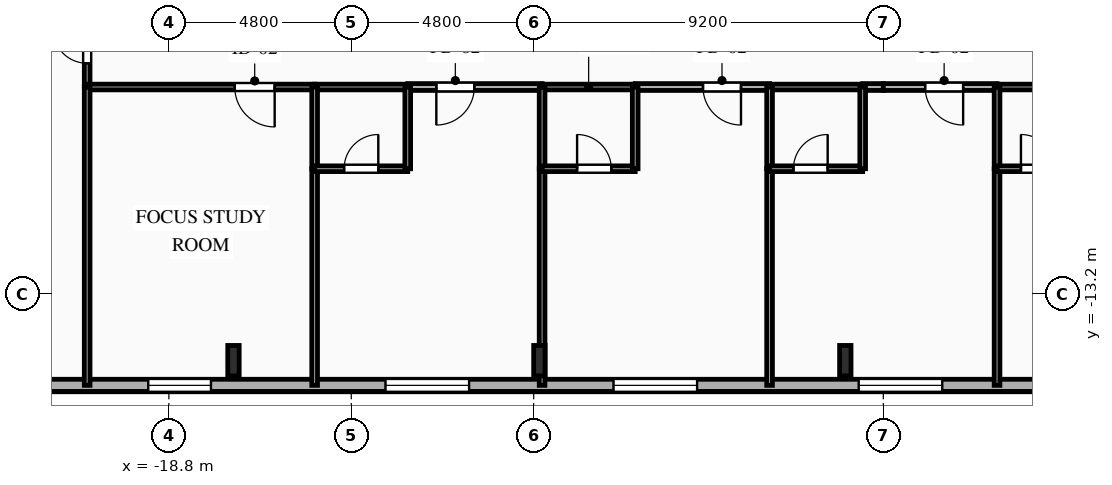
"""IFC4 building model, lengths in metres.
Left out: names, types, materials, properties, quantities, classifications, styles, units other than length and angle.
Written with IfcOpenShell. Run it as: python <this file> out.ifc"""

import sys

from ifc_helpers import new_model, si_unit, direction, frame, frame_2d, origin, origin_2d, place, context, subcontext, project, spatial, rectangle, i_section, extrude, element, fill, save


model = new_model("IFC4")
c1 = context("Model", 3, precision=1e-05, world=origin(), true_north=direction((0.0, 1.0)))
c2 = subcontext(c1, "Body", "Model", "MODEL_VIEW")
j1 = project(units=[si_unit("LENGTHUNIT", "METRE"), si_unit("PLANEANGLEUNIT", "RADIAN")], contexts=[c1])
p1 = place(None, origin())
s1 = spatial("IfcSite", under=j1, at=p1, CompositionType="ELEMENT")
p2 = place(p1, origin())
s2 = spatial("IfcBuilding", under=s1, at=p2, CompositionType="ELEMENT")
p3 = place(p2, frame((0.0, 0.0, 154.45)))
s3 = spatial("IfcBuildingStorey", under=s2, at=p3, CompositionType="ELEMENT", Elevation=154.45)
for number, where, z_axis, x_axis in (
    (1, (-17.1, -14.95, 0.0), (0.0, 0.0, 1.0), (1.0, 0.0, 0.0)),
    (2, (-9.05, -14.95, 0.0), (0.0, 0.0, 1.0), (1.0, 0.0, 0.0)),
    (3, (-1.0, -14.95, 0.0), (0.0, 0.0, 1.0), (1.0, 0.0, 0.0)),
):
    element("IfcColumn", number, at=place(p3, frame(where, z_axis=z_axis, x_axis=x_axis)), inside=s3, PredefinedType="COLUMN", context=c2, shape_type="SweptSolid", body=[
        extrude(i_section(OverallWidth=0.3, OverallDepth=0.8, WebThickness=0.018, FlangeThickness=0.033, FilletRadius=0.03, at=origin_2d()), origin(), (0.0, 0.0, 1.0), 3.35),
    ])
p4 = place(p3, frame((23.8, -15.6, 0.0), z_axis=(0.0, 0.0, 1.0), x_axis=(-1.0, 0.0, 0.0)))
e4 = element("IfcWall", 4, at=p4, inside=s3, PredefinedType="SOLIDWALL", context=c2, shape_type="SweptSolid", body=[
    extrude(rectangle(XDim=49.6, YDim=0.32, at=frame_2d((24.8, 0.0))), origin(), (0.0, 0.0, 1.0), 3.04),
])
p5 = place(p4, frame((1.13, 0.0, 0.85)))
e5 = element("IfcOpeningElement", 5, at=p5, cuts=e4, PredefinedType="OPENING", context=c2, shape_type="SweptSolid", body=[
    extrude(rectangle(XDim=1.1, YDim=1.85, at=frame_2d((0.55, 0.925))), frame((0.0, 0.17, 0.0), z_axis=(0.0, -1.0, 0.0), x_axis=(1.0, 0.0, 0.0)), (0.0, 0.0, 1.0), 0.34),
])
p6 = place(p4, frame((5.055, 0.0, 0.85)))
e6 = element("IfcOpeningElement", 6, at=p6, cuts=e4, PredefinedType="OPENING", context=c2, shape_type="SweptSolid", body=[
    extrude(rectangle(XDim=1.65, YDim=1.85, at=frame_2d((0.825, 0.925))), frame((0.0, 0.17, 0.0), z_axis=(0.0, -1.0, 0.0), x_axis=(1.0, 0.0, 0.0)), (0.0, 0.0, 1.0), 0.34),
])
p7 = place(p4, frame((10.78, 0.0, 0.85)))
e7 = element("IfcOpeningElement", 7, at=p7, cuts=e4, PredefinedType="OPENING", context=c2, shape_type="SweptSolid", body=[
    extrude(rectangle(XDim=2.2, YDim=1.85, at=frame_2d((1.1, 0.925))), frame((0.0, 0.17, 0.0), z_axis=(0.0, -1.0, 0.0), x_axis=(1.0, 0.0, 0.0)), (0.0, 0.0, 1.0), 0.34),
])
p8 = place(p4, frame((17.284, 0.0, 0.85)))
e8 = element("IfcOpeningElement", 8, at=p8, cuts=e4, PredefinedType="OPENING", context=c2, shape_type="SweptSolid", body=[
    extrude(rectangle(XDim=2.2, YDim=1.85, at=frame_2d((1.1, 0.925))), frame((0.0, 0.17, 0.0), z_axis=(0.0, -1.0, 0.0), x_axis=(1.0, 0.0, 0.0)), (0.0, 0.0, 1.0), 0.34),
])
p9 = place(p4, frame((22.248, 0.0, 0.85)))
e9 = element("IfcOpeningElement", 9, at=p9, cuts=e4, PredefinedType="OPENING", context=c2, shape_type="SweptSolid", body=[
    extrude(rectangle(XDim=2.2, YDim=1.85, at=frame_2d((1.1, 0.925))), frame((0.0, 0.17, 0.0), z_axis=(0.0, -1.0, 0.0), x_axis=(1.0, 0.0, 0.0)), (0.0, 0.0, 1.0), 0.34),
])
p10 = place(p4, frame((28.7, 0.0, 0.85)))
e10 = element("IfcOpeningElement", 10, at=p10, cuts=e4, PredefinedType="OPENING", context=c2, shape_type="SweptSolid", body=[
    extrude(rectangle(XDim=2.2, YDim=1.85, at=frame_2d((1.1, 0.925))), frame((0.0, 0.17, 0.0), z_axis=(0.0, -1.0, 0.0), x_axis=(1.0, 0.0, 0.0)), (0.0, 0.0, 1.0), 0.34),
])
p11 = place(p4, frame((34.7, 0.0, 0.85)))
e11 = element("IfcOpeningElement", 11, at=p11, cuts=e4, PredefinedType="OPENING", context=c2, shape_type="SweptSolid", body=[
    extrude(rectangle(XDim=2.2, YDim=1.85, at=frame_2d((1.1, 0.925))), frame((0.0, 0.17, 0.0), z_axis=(0.0, -1.0, 0.0), x_axis=(1.0, 0.0, 0.0)), (0.0, 0.0, 1.0), 0.34),
])
p12 = place(p4, frame((41.492, 0.0, 0.85)))
e12 = element("IfcOpeningElement", 12, at=p12, cuts=e4, PredefinedType="OPENING", context=c2, shape_type="SweptSolid", body=[
    extrude(rectangle(XDim=1.65, YDim=1.85, at=frame_2d((0.825, 0.925))), frame((0.0, 0.17, 0.0), z_axis=(0.0, -1.0, 0.0), x_axis=(1.0, 0.0, 0.0)), (0.0, 0.0, 1.0), 0.34),
])
p13 = place(p4, frame((46.175, 0.0, 0.85)))
e13 = element("IfcOpeningElement", 13, at=p13, cuts=e4, PredefinedType="OPENING", context=c2, shape_type="SweptSolid", body=[
    extrude(rectangle(XDim=1.65, YDim=1.85, at=frame_2d((0.825, 0.925))), frame((0.0, 0.17, 0.0), z_axis=(0.0, -1.0, 0.0), x_axis=(1.0, 0.0, 0.0)), (0.0, 0.0, 1.0), 0.34),
])
p14 = place(p3, frame((-20.95, -7.75, 0.0), z_axis=(0.0, 0.0, 1.0), x_axis=(0.0, 1.0, 0.0)))
e14 = element("IfcWall", 14, at=p14, inside=s3, PredefinedType="PARTITIONING", context=c2, shape_type="SweptSolid", body=[
    extrude(rectangle(XDim=2.15, YDim=0.15, at=frame_2d((1.075, 0.0))), origin(), (0.0, 0.0, 1.0), 3.04),
])
p15 = place(p14, frame((0.625, 0.0, 0.0)))
e15 = element("IfcOpeningElement", 15, at=p15, cuts=e14, PredefinedType="OPENING", context=c2, shape_type="SweptSolid", body=[
    extrude(rectangle(XDim=0.9, YDim=2.1, at=frame_2d((0.45, 1.05))), frame((0.0, 0.085, 0.0), z_axis=(0.0, -1.0, 0.0), x_axis=(1.0, 0.0, 0.0)), (0.0, 0.0, 1.0), 0.17),
])
p16 = place(p3, frame((-14.964, -7.75, 0.0), z_axis=(0.0, 0.0, 1.0), x_axis=(-1.0, 0.0, 0.0)))
e16 = element("IfcWall", 16, at=p16, inside=s3, PredefinedType="PARTITIONING", context=c2, shape_type="SweptSolid", body=[
    extrude(rectangle(XDim=5.986, YDim=0.15, at=frame_2d((2.993, 0.0))), origin(), (0.0, 0.0, 1.0), 3.04),
])
p17 = place(p16, frame((1.052, 0.0, 0.0)))
e17 = element("IfcOpeningElement", 17, at=p17, cuts=e16, PredefinedType="OPENING", context=c2, shape_type="SweptSolid", body=[
    extrude(rectangle(XDim=1.05, YDim=2.15, at=frame_2d((0.525, 1.075))), frame((0.0, 0.085, 0.0), z_axis=(0.0, -1.0, 0.0), x_axis=(1.0, 0.0, 0.0)), (0.0, 0.0, 1.0), 0.17),
])
p18 = place(p3, frame((-8.979, -7.75, 0.0), z_axis=(0.0, 0.0, 1.0), x_axis=(-1.0, 0.0, 0.0)))
e18 = element("IfcWall", 18, at=p18, inside=s3, PredefinedType="PARTITIONING", context=c2, shape_type="SweptSolid", body=[
    extrude(rectangle(XDim=3.535, YDim=0.18, at=frame_2d((1.768, 0.0))), origin(), (0.0, 0.0, 1.0), 3.04),
])
p19 = place(p18, frame((1.783, 0.0, 0.0)))
e19 = element("IfcOpeningElement", 19, at=p19, cuts=e18, PredefinedType="OPENING", context=c2, shape_type="SweptSolid", body=[
    extrude(rectangle(XDim=1.0, YDim=2.15, at=frame_2d((0.5, 1.075))), frame((0.0, 0.1, 0.0), z_axis=(0.0, -1.0, 0.0), x_axis=(1.0, 0.0, 0.0)), (0.0, 0.0, 1.0), 0.2),
])
p20 = place(p3, frame((-12.514, -7.75, 0.0), z_axis=(0.0, 0.0, 1.0), x_axis=(-1.0, 0.0, 0.0)))
e20 = element("IfcWall", 20, at=p20, inside=s3, PredefinedType="PLUMBINGWALL", context=c2, shape_type="SweptSolid", body=[
    extrude(rectangle(XDim=2.45, YDim=0.15, at=frame_2d((1.225, 0.0))), origin(), (0.0, 0.0, 1.0), 3.04),
])
p21 = place(p3, frame((-2.993, -7.75, 0.0), z_axis=(0.0, 0.0, 1.0), x_axis=(-1.0, 0.0, 0.0)))
e21 = element("IfcWall", 21, at=p21, inside=s3, PredefinedType="PARTITIONING", context=c2, shape_type="SweptSolid", body=[
    extrude(rectangle(XDim=3.536, YDim=0.18, at=frame_2d((1.768, 0.0))), origin(), (0.0, 0.0, 1.0), 3.04),
])
p22 = place(p21, frame((0.752, 0.0, 0.0)))
e22 = element("IfcOpeningElement", 22, at=p22, cuts=e21, PredefinedType="OPENING", context=c2, shape_type="SweptSolid", body=[
    extrude(rectangle(XDim=1.0, YDim=2.15, at=frame_2d((0.5, 1.075))), frame((0.0, 0.1, 0.0), z_axis=(0.0, -1.0, 0.0), x_axis=(1.0, 0.0, 0.0)), (0.0, 0.0, 1.0), 0.2),
])
p23 = place(p3, frame((-6.529, -7.75, 0.0), z_axis=(0.0, 0.0, 1.0), x_axis=(-1.0, 0.0, 0.0)))
e23 = element("IfcWall", 23, at=p23, inside=s3, PredefinedType="PLUMBINGWALL", context=c2, shape_type="SweptSolid", body=[
    extrude(rectangle(XDim=2.45, YDim=0.15, at=frame_2d((1.225, 0.0))), origin(), (0.0, 0.0, 1.0), 3.04),
])
p24 = place(p3, frame((0.0, -7.75, 0.0), z_axis=(0.0, 0.0, 1.0), x_axis=(-1.0, 0.0, 0.0)))
e24 = element("IfcWall", 24, at=p24, inside=s3, PredefinedType="PARTITIONING", context=c2, shape_type="SweptSolid", body=[
    extrude(rectangle(XDim=0.543, YDim=0.18, at=frame_2d((0.271, 0.0))), origin(), (0.0, 0.0, 1.0), 3.04),
])
p25 = place(p3, frame((-0.543, -7.75, 0.0), z_axis=(0.0, 0.0, 1.0), x_axis=(-1.0, 0.0, 0.0)))
e25 = element("IfcWall", 25, at=p25, inside=s3, PredefinedType="PLUMBINGWALL", context=c2, shape_type="SweptSolid", body=[
    extrude(rectangle(XDim=2.45, YDim=0.15, at=frame_2d((1.225, 0.0))), origin(), (0.0, 0.0, 1.0), 3.04),
])
p26 = place(p3, frame((2.993, -7.75, 0.0), z_axis=(0.0, 0.0, 1.0), x_axis=(-1.0, 0.0, 0.0)))
e26 = element("IfcWall", 26, at=p26, inside=s3, PredefinedType="PARTITIONING", context=c2, shape_type="SweptSolid", body=[
    extrude(rectangle(XDim=2.993, YDim=0.18, at=frame_2d((1.497, 0.0))), origin(), (0.0, 0.0, 1.0), 3.04),
])
p27 = place(p26, frame((0.892, 0.0, 0.0)))
e27 = element("IfcOpeningElement", 27, at=p27, cuts=e26, PredefinedType="OPENING", context=c2, shape_type="SweptSolid", body=[
    extrude(rectangle(XDim=1.0, YDim=2.15, at=frame_2d((0.5, 1.075))), frame((0.0, 0.1, 0.0), z_axis=(0.0, -1.0, 0.0), x_axis=(1.0, 0.0, 0.0)), (0.0, 0.0, 1.0), 0.2),
])
p28 = place(p3, frame((5.443, -7.75, 0.0), z_axis=(0.0, 0.0, 1.0), x_axis=(-1.0, 0.0, 0.0)))
e28 = element("IfcWall", 28, at=p28, inside=s3, PredefinedType="PLUMBINGWALL", context=c2, shape_type="SweptSolid", body=[
    extrude(rectangle(XDim=2.45, YDim=0.15, at=frame_2d((1.225, 0.0))), origin(), (0.0, 0.0, 1.0), 3.04),
])
p29 = place(p3, frame((-20.95, -7.75, 0.0), z_axis=(0.0, 0.0, 1.0), x_axis=(0.0, -1.0, 0.0)))
e29 = element("IfcWall", 29, at=p29, inside=s3, PredefinedType="PARTITIONING", context=c2, shape_type="SweptSolid", body=[
    extrude(rectangle(XDim=7.85, YDim=0.15, at=frame_2d((3.925, 0.0))), origin(), (0.0, 0.0, 1.0), 3.04),
])
p30 = place(p3, frame((-14.964, -9.9, 0.0), z_axis=(0.0, 0.0, 1.0), x_axis=(0.0, -1.0, 0.0)))
e30 = element("IfcWall", 30, at=p30, inside=s3, PredefinedType="PARTITIONING", context=c2, shape_type="SweptSolid", body=[
    extrude(rectangle(XDim=5.7, YDim=0.15, at=frame_2d((2.85, 0.0))), origin(), (0.0, 0.0, 1.0), 3.04),
])
p31 = place(p3, frame((-14.964, -7.75, 0.0), z_axis=(0.0, 0.0, 1.0), x_axis=(0.0, -1.0, 0.0)))
e31 = element("IfcWall", 31, at=p31, inside=s3, PredefinedType="PLUMBINGWALL", context=c2, shape_type="SweptSolid", body=[
    extrude(rectangle(XDim=2.15, YDim=0.15, at=frame_2d((1.075, 0.0))), origin(), (0.0, 0.0, 1.0), 3.04),
])
p32 = place(p3, frame((-14.964, -9.9, 0.0), z_axis=(0.0, 0.0, 1.0), x_axis=(1.0, 0.0, 0.0)))
e32 = element("IfcWall", 32, at=p32, inside=s3, PredefinedType="PLUMBINGWALL", context=c2, shape_type="SweptSolid", body=[
    extrude(rectangle(XDim=2.45, YDim=0.15, at=frame_2d((1.225, 0.0))), origin(), (0.0, 0.0, 1.0), 3.04),
])
p33 = place(p32, frame((0.775, 0.0, 0.0)))
e33 = element("IfcOpeningElement", 33, at=p33, cuts=e32, PredefinedType="OPENING", context=c2, shape_type="SweptSolid", body=[
    extrude(rectangle(XDim=0.9, YDim=2.1, at=frame_2d((0.45, 1.05))), frame((0.0, 0.085, 0.0), z_axis=(0.0, -1.0, 0.0), x_axis=(1.0, 0.0, 0.0)), (0.0, 0.0, 1.0), 0.17),
])
p34 = place(p3, frame((-12.514, -9.9, 0.0), z_axis=(0.0, 0.0, 1.0), x_axis=(0.0, 1.0, 0.0)))
e34 = element("IfcWall", 34, at=p34, inside=s3, PredefinedType="PLUMBINGWALL", context=c2, shape_type="SweptSolid", body=[
    extrude(rectangle(XDim=2.15, YDim=0.15, at=frame_2d((1.075, 0.0))), origin(), (0.0, 0.0, 1.0), 3.04),
])
p35 = place(p3, frame((-8.979, -9.9, 0.0), z_axis=(0.0, 0.0, 1.0), x_axis=(0.0, -1.0, 0.0)))
e35 = element("IfcWall", 35, at=p35, inside=s3, PredefinedType="PARTITIONING", context=c2, shape_type="SweptSolid", body=[
    extrude(rectangle(XDim=5.7, YDim=0.15, at=frame_2d((2.85, 0.0))), origin(), (0.0, 0.0, 1.0), 2.525),
])
p36 = place(p3, frame((-8.979, -7.75, 0.0), z_axis=(0.0, 0.0, 1.0), x_axis=(0.0, -1.0, 0.0)))
e36 = element("IfcWall", 36, at=p36, inside=s3, PredefinedType="PLUMBINGWALL", context=c2, shape_type="SweptSolid", body=[
    extrude(rectangle(XDim=2.15, YDim=0.15, at=frame_2d((1.075, 0.0))), origin(), (0.0, 0.0, 1.0), 2.525),
])
p37 = place(p3, frame((-8.979, -9.9, 0.0), z_axis=(0.0, 0.0, 1.0), x_axis=(1.0, 0.0, 0.0)))
e37 = element("IfcWall", 37, at=p37, inside=s3, PredefinedType="PLUMBINGWALL", context=c2, shape_type="SweptSolid", body=[
    extrude(rectangle(XDim=2.45, YDim=0.15, at=frame_2d((1.225, 0.0))), origin(), (0.0, 0.0, 1.0), 3.04),
])
p38 = place(p37, frame((0.921, 0.0, 0.0)))
e38 = element("IfcOpeningElement", 38, at=p38, cuts=e37, PredefinedType="OPENING", context=c2, shape_type="SweptSolid", body=[
    extrude(rectangle(XDim=0.9, YDim=2.1, at=frame_2d((0.45, 1.05))), frame((0.0, 0.085, 0.0), z_axis=(0.0, -1.0, 0.0), x_axis=(1.0, 0.0, 0.0)), (0.0, 0.0, 1.0), 0.17),
])
p39 = place(p3, frame((-6.529, -9.9, 0.0), z_axis=(0.0, 0.0, 1.0), x_axis=(0.0, 1.0, 0.0)))
e39 = element("IfcWall", 39, at=p39, inside=s3, PredefinedType="PLUMBINGWALL", context=c2, shape_type="SweptSolid", body=[
    extrude(rectangle(XDim=2.15, YDim=0.15, at=frame_2d((1.075, 0.0))), origin(), (0.0, 0.0, 1.0), 3.04),
])
p40 = place(p3, frame((-2.993, -9.9, 0.0), z_axis=(0.0, 0.0, 1.0), x_axis=(0.0, -1.0, 0.0)))
e40 = element("IfcWall", 40, at=p40, inside=s3, PredefinedType="PARTITIONING", context=c2, shape_type="SweptSolid", body=[
    extrude(rectangle(XDim=5.7, YDim=0.15, at=frame_2d((2.85, 0.0))), origin(), (0.0, 0.0, 1.0), 3.04),
])
p41 = place(p3, frame((-2.993, -7.75, 0.0), z_axis=(0.0, 0.0, 1.0), x_axis=(0.0, -1.0, 0.0)))
e41 = element("IfcWall", 41, at=p41, inside=s3, PredefinedType="PLUMBINGWALL", context=c2, shape_type="SweptSolid", body=[
    extrude(rectangle(XDim=2.15, YDim=0.15, at=frame_2d((1.075, 0.0))), origin(), (0.0, 0.0, 1.0), 3.04),
])
p42 = place(p3, frame((-2.993, -9.9, 0.0), z_axis=(0.0, 0.0, 1.0), x_axis=(1.0, 0.0, 0.0)))
e42 = element("IfcWall", 42, at=p42, inside=s3, PredefinedType="PLUMBINGWALL", context=c2, shape_type="SweptSolid", body=[
    extrude(rectangle(XDim=2.45, YDim=0.15, at=frame_2d((1.225, 0.0))), origin(), (0.0, 0.0, 1.0), 3.04),
])
p43 = place(p42, frame((0.629, 0.0, 0.0)))
e43 = element("IfcOpeningElement", 43, at=p43, cuts=e42, PredefinedType="OPENING", context=c2, shape_type="SweptSolid", body=[
    extrude(rectangle(XDim=0.9, YDim=2.1, at=frame_2d((0.45, 1.05))), frame((0.0, 0.085, 0.0), z_axis=(0.0, -1.0, 0.0), x_axis=(1.0, 0.0, 0.0)), (0.0, 0.0, 1.0), 0.17),
])
p44 = place(p3, frame((-0.543, -9.9, 0.0), z_axis=(0.0, 0.0, 1.0), x_axis=(0.0, 1.0, 0.0)))
e44 = element("IfcWall", 44, at=p44, inside=s3, PredefinedType="PLUMBINGWALL", context=c2, shape_type="SweptSolid", body=[
    extrude(rectangle(XDim=2.15, YDim=0.15, at=frame_2d((1.075, 0.0))), origin(), (0.0, 0.0, 1.0), 3.04),
])
p45 = place(p3, frame((2.993, -9.9, 0.0), z_axis=(0.0, 0.0, 1.0), x_axis=(0.0, -1.0, 0.0)))
e45 = element("IfcWall", 45, at=p45, inside=s3, PredefinedType="PARTITIONING", context=c2, shape_type="SweptSolid", body=[
    extrude(rectangle(XDim=5.7, YDim=0.15, at=frame_2d((2.85, 0.0))), origin(), (0.0, 0.0, 1.0), 3.04),
])
p46 = place(p3, frame((2.993, -7.75, 0.0), z_axis=(0.0, 0.0, 1.0), x_axis=(0.0, -1.0, 0.0)))
e46 = element("IfcWall", 46, at=p46, inside=s3, PredefinedType="PLUMBINGWALL", context=c2, shape_type="SweptSolid", body=[
    extrude(rectangle(XDim=2.15, YDim=0.15, at=frame_2d((1.075, 0.0))), origin(), (0.0, 0.0, 1.0), 3.04),
])
p47 = place(p3, frame((2.993, -9.9, 0.0), z_axis=(0.0, 0.0, 1.0), x_axis=(1.0, 0.0, 0.0)))
e47 = element("IfcWall", 47, at=p47, inside=s3, PredefinedType="PLUMBINGWALL", context=c2, shape_type="SweptSolid", body=[
    extrude(rectangle(XDim=2.45, YDim=0.15, at=frame_2d((1.225, 0.0))), origin(), (0.0, 0.0, 1.0), 3.04),
])
p48 = place(p47, frame((0.629, 0.0, 0.0)))
e48 = element("IfcOpeningElement", 48, at=p48, cuts=e47, PredefinedType="OPENING", context=c2, shape_type="SweptSolid", body=[
    extrude(rectangle(XDim=0.9, YDim=2.1, at=frame_2d((0.45, 1.05))), frame((0.0, 0.085, 0.0), z_axis=(0.0, -1.0, 0.0), x_axis=(1.0, 0.0, 0.0)), (0.0, 0.0, 1.0), 0.17),
])
p49 = place(p9, origin())
e49 = element("IfcWindow", 49, at=p49, inside=s3, PartitioningType="SINGLE_PANEL", PredefinedType="WINDOW", context=c2, shape_type="SweptSolid", body=[
    extrude(rectangle(XDim=2.2, YDim=1.85, at=frame_2d((1.1, 0.925))), frame((0.0, 0.03, 0.0), z_axis=(0.0, -1.0, 0.0), x_axis=(1.0, 0.0, 0.0)), (0.0, 0.0, 1.0), 0.06),
])
fill(e9, e49)
p50 = place(p10, origin())
e50 = element("IfcWindow", 50, at=p50, inside=s3, PartitioningType="SINGLE_PANEL", PredefinedType="WINDOW", context=c2, shape_type="SweptSolid", body=[
    extrude(rectangle(XDim=2.2, YDim=1.85, at=frame_2d((1.1, 0.925))), frame((0.0, 0.03, 0.0), z_axis=(0.0, -1.0, 0.0), x_axis=(1.0, 0.0, 0.0)), (0.0, 0.0, 1.0), 0.06),
])
fill(e10, e50)
p51 = place(p11, origin())
e51 = element("IfcWindow", 51, at=p51, inside=s3, PartitioningType="SINGLE_PANEL", PredefinedType="WINDOW", context=c2, shape_type="SweptSolid", body=[
    extrude(rectangle(XDim=2.2, YDim=1.85, at=frame_2d((1.1, 0.925))), frame((0.0, 0.03, 0.0), z_axis=(0.0, -1.0, 0.0), x_axis=(1.0, 0.0, 0.0)), (0.0, 0.0, 1.0), 0.06),
])
fill(e11, e51)
p52 = place(p12, origin())
e52 = element("IfcWindow", 52, at=p52, inside=s3, PartitioningType="SINGLE_PANEL", PredefinedType="WINDOW", context=c2, shape_type="SweptSolid", body=[
    extrude(rectangle(XDim=1.65, YDim=1.85, at=frame_2d((0.825, 0.925))), frame((0.0, 0.03, 0.0), z_axis=(0.0, -1.0, 0.0), x_axis=(1.0, 0.0, 0.0)), (0.0, 0.0, 1.0), 0.06),
])
fill(e12, e52)
p53 = place(p15, origin())
e53 = element("IfcDoor", 53, at=p53, inside=s3, OperationType="SINGLE_SWING_RIGHT", PredefinedType="DOOR", context=c2, shape_type="SweptSolid", body=[
    extrude(rectangle(XDim=0.9, YDim=2.1, at=frame_2d((0.45, 1.05))), frame((0.0, 0.025, 0.0), z_axis=(0.0, -1.0, 0.0), x_axis=(1.0, 0.0, 0.0)), (0.0, 0.0, 1.0), 0.05),
])
fill(e15, e53)
p54 = place(p17, origin())
e54 = element("IfcDoor", 54, at=p54, inside=s3, OperationType="SINGLE_SWING_LEFT", PredefinedType="DOOR", context=c2, shape_type="SweptSolid", body=[
    extrude(rectangle(XDim=1.05, YDim=2.15, at=frame_2d((0.525, 1.075))), frame((0.0, 0.025, 0.0), z_axis=(0.0, -1.0, 0.0), x_axis=(1.0, 0.0, 0.0)), (0.0, 0.0, 1.0), 0.05),
])
fill(e17, e54)
p55 = place(p19, origin())
e55 = element("IfcDoor", 55, at=p55, inside=s3, OperationType="SINGLE_SWING_RIGHT", PredefinedType="DOOR", context=c2, shape_type="SweptSolid", body=[
    extrude(rectangle(XDim=1.0, YDim=2.15, at=frame_2d((0.5, 1.075))), frame((0.0, 0.025, 0.0), z_axis=(0.0, -1.0, 0.0), x_axis=(1.0, 0.0, 0.0)), (0.0, 0.0, 1.0), 0.05),
])
fill(e19, e55)
p56 = place(p22, origin())
e56 = element("IfcDoor", 56, at=p56, inside=s3, OperationType="SINGLE_SWING_LEFT", PredefinedType="DOOR", context=c2, shape_type="SweptSolid", body=[
    extrude(rectangle(XDim=1.0, YDim=2.15, at=frame_2d((0.5, 1.075))), frame((0.0, 0.025, 0.0), z_axis=(0.0, -1.0, 0.0), x_axis=(1.0, 0.0, 0.0)), (0.0, 0.0, 1.0), 0.05),
])
fill(e22, e56)
p57 = place(p27, origin())
e57 = element("IfcDoor", 57, at=p57, inside=s3, OperationType="SINGLE_SWING_LEFT", PredefinedType="DOOR", context=c2, shape_type="SweptSolid", body=[
    extrude(rectangle(XDim=1.0, YDim=2.15, at=frame_2d((0.5, 1.075))), frame((0.0, 0.025, 0.0), z_axis=(0.0, -1.0, 0.0), x_axis=(1.0, 0.0, 0.0)), (0.0, 0.0, 1.0), 0.05),
])
fill(e27, e57)
p58 = place(p33, origin())
e58 = element("IfcDoor", 58, at=p58, inside=s3, OperationType="SINGLE_SWING_RIGHT", PredefinedType="DOOR", context=c2, shape_type="SweptSolid", body=[
    extrude(rectangle(XDim=0.9, YDim=2.1, at=frame_2d((0.45, 1.05))), frame((0.0, 0.025, 0.0), z_axis=(0.0, -1.0, 0.0), x_axis=(1.0, 0.0, 0.0)), (0.0, 0.0, 1.0), 0.05),
])
fill(e33, e58)
p59 = place(p38, origin())
e59 = element("IfcDoor", 59, at=p59, inside=s3, OperationType="SINGLE_SWING_LEFT", PredefinedType="DOOR", context=c2, shape_type="SweptSolid", body=[
    extrude(rectangle(XDim=0.9, YDim=2.1, at=frame_2d((0.45, 1.05))), frame((0.0, 0.025, 0.0), z_axis=(0.0, -1.0, 0.0), x_axis=(1.0, 0.0, 0.0)), (0.0, 0.0, 1.0), 0.05),
])
fill(e38, e59)
p60 = place(p43, origin())
e60 = element("IfcDoor", 60, at=p60, inside=s3, OperationType="SINGLE_SWING_RIGHT", PredefinedType="DOOR", context=c2, shape_type="SweptSolid", body=[
    extrude(rectangle(XDim=0.9, YDim=2.1, at=frame_2d((0.45, 1.05))), frame((0.0, 0.025, 0.0), z_axis=(0.0, -1.0, 0.0), x_axis=(1.0, 0.0, 0.0)), (0.0, 0.0, 1.0), 0.05),
])
fill(e43, e60)
p61 = place(p48, origin())
e61 = element("IfcDoor", 61, at=p61, inside=s3, OperationType="SINGLE_SWING_LEFT", PredefinedType="DOOR", context=c2, shape_type="SweptSolid", body=[
    extrude(rectangle(XDim=0.9, YDim=2.1, at=frame_2d((0.45, 1.05))), frame((0.0, 0.025, 0.0), z_axis=(0.0, -1.0, 0.0), x_axis=(1.0, 0.0, 0.0)), (0.0, 0.0, 1.0), 0.05),
])
fill(e48, e61)
save(model, sys.argv[1])
